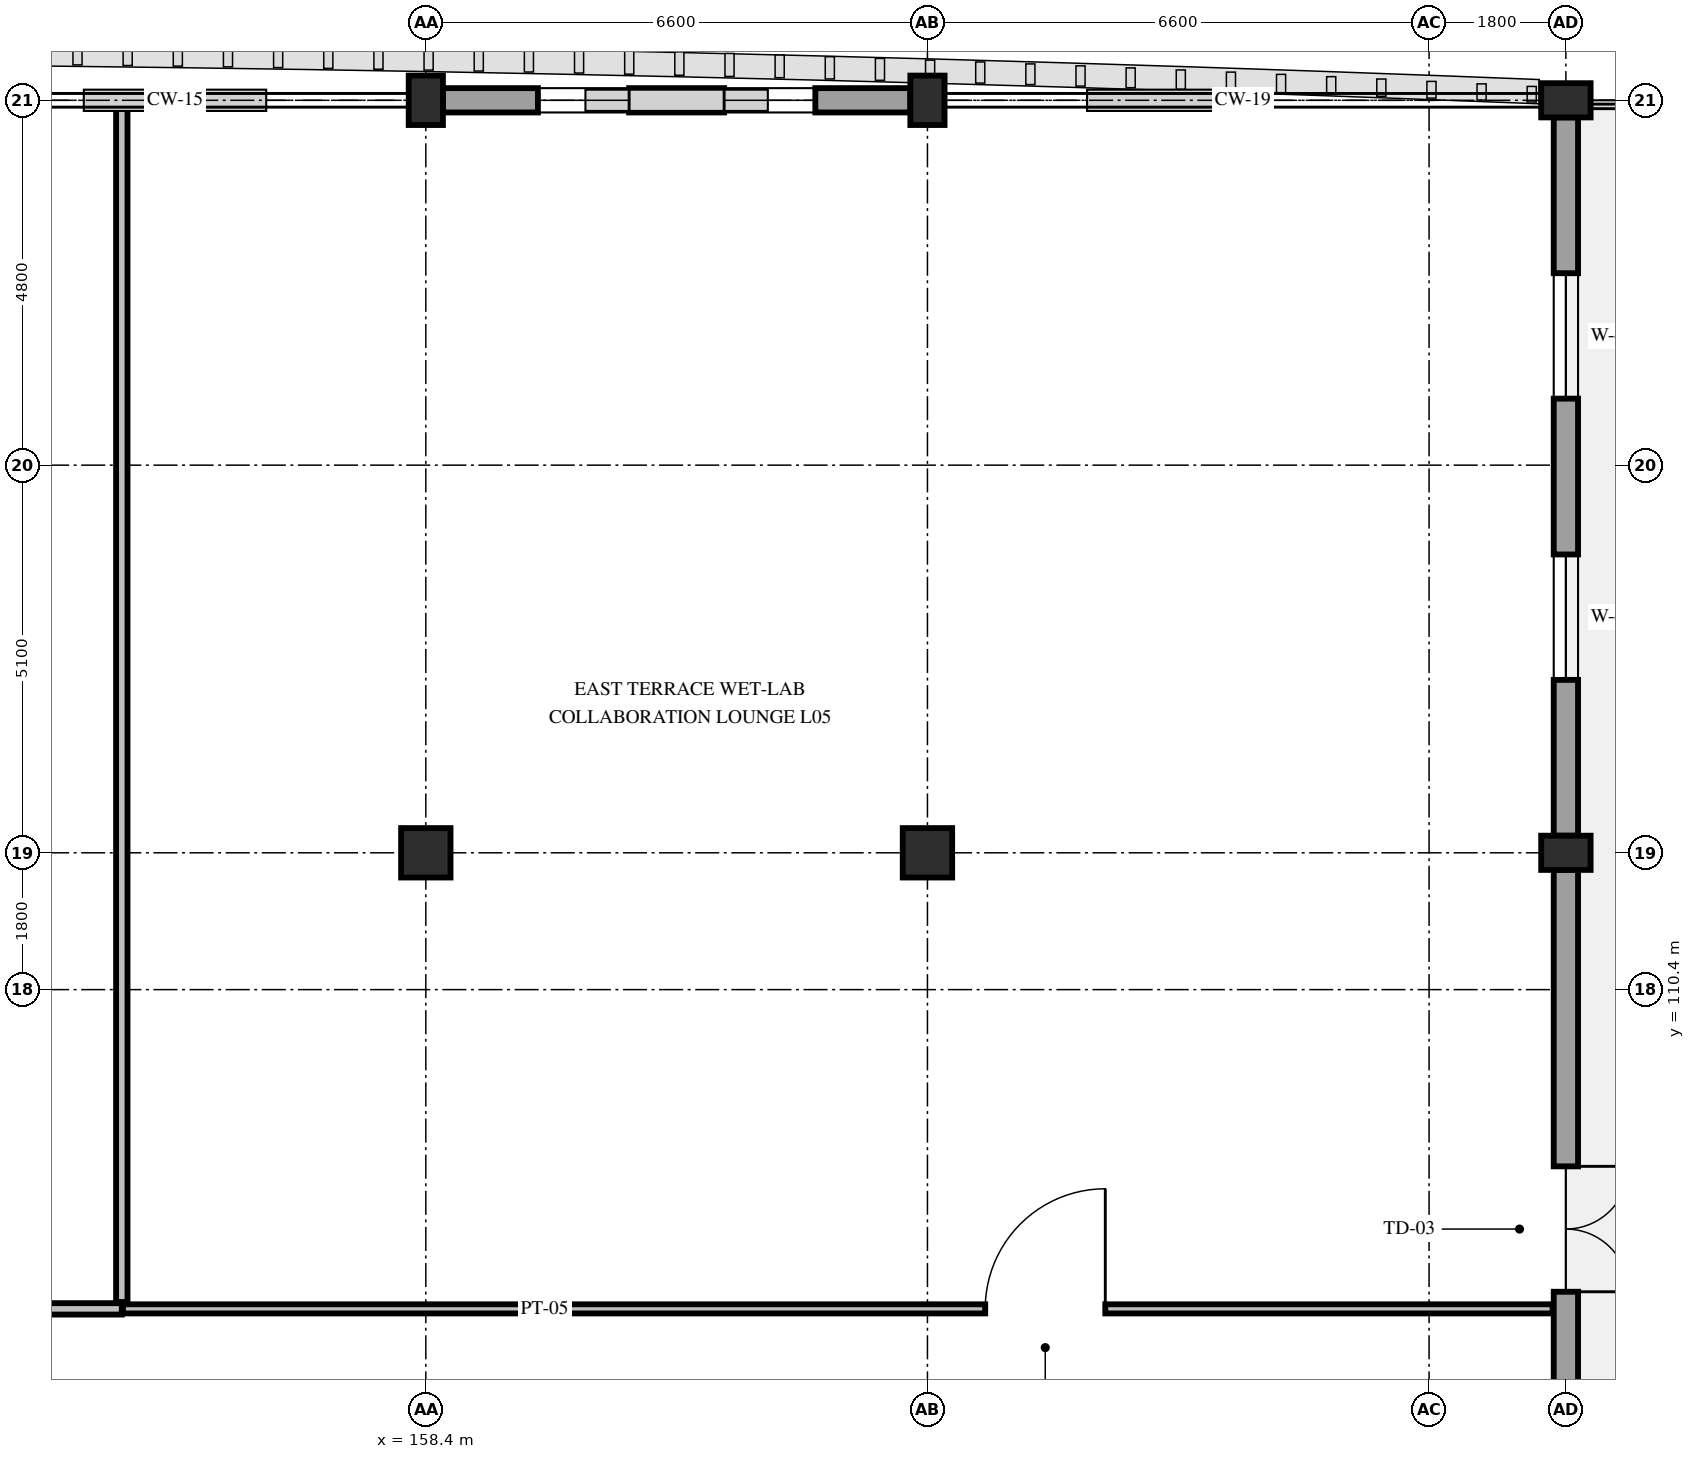
"""IFC4 building model, lengths in metres.
Left out: names, types, materials, properties, quantities, classifications, styles, units other than length and angle.
Written with IfcOpenShell. Run it as: python <this file> out.ifc"""

import sys

from ifc_helpers import new_model, si_unit, direction, frame, frame_2d, origin, origin_2d, place, context, subcontext, project, spatial, rectangle, extrude, element, fill, save


model = new_model("IFC4")
c1 = context("Model", 3, precision=1e-05, world=origin(), true_north=direction((0.0, 1.0)))
c2 = subcontext(c1, "Body", "Model", "MODEL_VIEW")
j1 = project(units=[si_unit("LENGTHUNIT", "METRE"), si_unit("PLANEANGLEUNIT", "RADIAN")], contexts=[c1])
p1 = place(None, origin())
s1 = spatial("IfcSite", under=j1, at=p1, CompositionType="ELEMENT")
p2 = place(p1, origin())
s2 = spatial("IfcBuilding", under=s1, at=p2, CompositionType="ELEMENT")
p3 = place(p2, frame((0.0, 0.0, 24.6)))
s3 = spatial("IfcBuildingStorey", under=s2, at=p3, CompositionType="ELEMENT", Elevation=24.6)
p4 = place(p3, frame((158.4, 112.2, 0.0), z_axis=(0.0, 0.0, 1.0), x_axis=(1.0, 0.0, 0.0)))
e1 = element("IfcColumn", 1, at=p4, inside=s3, PredefinedType="COLUMN", context=c2, shape_type="SweptSolid", body=[
    extrude(rectangle(XDim=0.65, YDim=0.65, at=origin_2d()), origin(), (0.0, 0.0, 1.0), 4.8),
])
p5 = place(p3, frame((158.4, 122.1, 0.0), z_axis=(0.0, 0.0, 1.0), x_axis=(1.0, 0.0, 0.0)))
e2 = element("IfcColumn", 2, at=p5, inside=s3, PredefinedType="PILASTER", context=c2, shape_type="SweptSolid", body=[
    extrude(rectangle(XDim=0.45, YDim=0.65, at=origin_2d()), origin(), (0.0, 0.0, 1.0), 4.8),
])
p6 = place(p3, frame((165.0, 112.2, 0.0), z_axis=(0.0, 0.0, 1.0), x_axis=(1.0, 0.0, 0.0)))
e3 = element("IfcColumn", 3, at=p6, inside=s3, PredefinedType="COLUMN", context=c2, shape_type="SweptSolid", body=[
    extrude(rectangle(XDim=0.65, YDim=0.65, at=origin_2d()), origin(), (0.0, 0.0, 1.0), 4.8),
])
for number, where, z_axis, x_axis in (
    (4, (165.0, 122.1, 0.0), (0.0, 0.0, 1.0), (1.0, 0.0, 0.0)),
    (5, (173.4, 112.2, 0.0), (0.0, 0.0, 1.0), (0.0, 1.0, 0.0)),
    (6, (173.4, 122.1, 0.0), (0.0, 0.0, 1.0), (0.0, 1.0, 0.0)),
):
    element("IfcColumn", number, at=place(p3, frame(where, z_axis=z_axis, x_axis=x_axis)), inside=s3, PredefinedType="PILASTER", context=c2, shape_type="SweptSolid", body=[
        extrude(rectangle(XDim=0.45, YDim=0.65, at=origin_2d()), origin(), (0.0, 0.0, 1.0), 4.8),
    ])
p7 = place(p3, frame((158.625, 122.1, 0.0), z_axis=(0.0, 0.0, 1.0), x_axis=(1.0, 0.0, 0.0)))
e7 = element("IfcWall", 7, at=p7, inside=s3, PredefinedType="STANDARD", context=c2, shape_type="SweptSolid", body=[
    extrude(rectangle(XDim=6.15, YDim=0.32, at=frame_2d((3.075, 0.0))), origin(), (0.0, 0.0, 1.0), 3.78),
])
p8 = place(p7, frame((1.25, 0.0, 0.85)))
e8 = element("IfcOpeningElement", 8, at=p8, cuts=e7, PredefinedType="OPENING", context=c2, shape_type="SweptSolid", body=[
    extrude(rectangle(XDim=1.2, YDim=2.08, at=frame_2d((0.6, 1.04))), frame((0.0, 0.175, 0.0), z_axis=(0.0, -1.0, 0.0), x_axis=(1.0, 0.0, 0.0)), (0.0, 0.0, 1.0), 0.35),
])
p9 = place(p7, frame((3.7, 0.0, 0.85)))
e9 = element("IfcOpeningElement", 9, at=p9, cuts=e7, PredefinedType="OPENING", context=c2, shape_type="SweptSolid", body=[
    extrude(rectangle(XDim=1.2, YDim=2.08, at=frame_2d((0.6, 1.04))), frame((0.0, 0.175, 0.0), z_axis=(0.0, -1.0, 0.0), x_axis=(1.0, 0.0, 0.0)), (0.0, 0.0, 1.0), 0.35),
])
p10 = place(p3, frame((173.4, 121.875, 0.0), z_axis=(0.0, 0.0, 1.0), x_axis=(0.0, -1.0, 0.0)))
e10 = element("IfcWall", 10, at=p10, inside=s3, PredefinedType="STANDARD", context=c2, shape_type="SweptSolid", body=[
    extrude(rectangle(XDim=9.45, YDim=0.32, at=frame_2d((4.725, 0.0))), origin(), (0.0, 0.0, 1.0), 3.83),
])
p11 = place(p10, frame((2.05, 0.0, 0.85)))
e11 = element("IfcOpeningElement", 11, at=p11, cuts=e10, PredefinedType="OPENING", context=c2, shape_type="SweptSolid", body=[
    extrude(rectangle(XDim=1.65, YDim=2.08, at=frame_2d((0.825, 1.04))), frame((0.0, 0.175, 0.0), z_axis=(0.0, -1.0, 0.0), x_axis=(1.0, 0.0, 0.0)), (0.0, 0.0, 1.0), 0.35),
])
p12 = place(p10, frame((5.75, 0.0, 0.85)))
e12 = element("IfcOpeningElement", 12, at=p12, cuts=e10, PredefinedType="OPENING", context=c2, shape_type="SweptSolid", body=[
    extrude(rectangle(XDim=1.65, YDim=2.08, at=frame_2d((0.825, 1.04))), frame((0.0, 0.175, 0.0), z_axis=(0.0, -1.0, 0.0), x_axis=(1.0, 0.0, 0.0)), (0.0, 0.0, 1.0), 0.35),
])
p13 = place(p3, frame((173.4, 111.975, 0.0), z_axis=(0.0, 0.0, 1.0), x_axis=(0.0, -1.0, 0.0)))
e13 = element("IfcWall", 13, at=p13, inside=s3, PredefinedType="STANDARD", context=c2, shape_type="SweptSolid", body=[
    extrude(rectangle(XDim=9.45, YDim=0.32, at=frame_2d((4.725, 0.0))), origin(), (0.0, 0.0, 1.0), 3.83),
])
p14 = place(p13, frame((3.9, 0.0, 0.0)))
e14 = element("IfcOpeningElement", 14, at=p14, cuts=e13, PredefinedType="OPENING", context=c2, shape_type="SweptSolid", body=[
    extrude(rectangle(XDim=1.65, YDim=2.25, at=frame_2d((0.825, 1.125))), frame((0.0, 0.175, 0.0), z_axis=(0.0, -1.0, 0.0), x_axis=(1.0, 0.0, 0.0)), (0.0, 0.0, 1.0), 0.35),
])
p15 = place(p3, frame((138.69, 106.2, 0.0), z_axis=(0.0, 0.0, 1.0), x_axis=(1.0, 0.0, 0.0)))
e15 = element("IfcWall", 15, at=p15, inside=s3, PredefinedType="PARTITIONING", context=c2, shape_type="SweptSolid", body=[
    extrude(rectangle(XDim=15.71, YDim=0.15, at=frame_2d((7.855, 0.0))), origin(), (0.0, 0.0, 1.0), 3.78),
])
p16 = place(p15, frame((7.31, 0.0, 0.0)))
e16 = element("IfcOpeningElement", 16, at=p16, cuts=e15, PredefinedType="OPENING", context=c2, shape_type="SweptSolid", body=[
    extrude(rectangle(XDim=1.5, YDim=2.25, at=frame_2d((0.75, 1.125))), frame((0.0, 0.09, 0.0), z_axis=(0.0, -1.0, 0.0), x_axis=(1.0, 0.0, 0.0)), (0.0, 0.0, 1.0), 0.18),
])
p17 = place(p3, frame((154.4, 106.29, 0.0), z_axis=(0.0, 0.0, 1.0), x_axis=(0.0, 1.0, 0.0)))
e17 = element("IfcWall", 17, at=p17, inside=s3, PredefinedType="PARTITIONING", context=c2, shape_type="SweptSolid", body=[
    extrude(rectangle(XDim=15.77, YDim=0.15, at=frame_2d((7.885, 0.0))), origin(), (0.0, 0.0, 1.0), 3.93),
])
p18 = place(p3, frame((154.415, 106.2, 0.0), z_axis=(0.0, 0.0, 1.0), x_axis=(1.0, 0.0, 0.0)))
e18 = element("IfcWall", 18, at=p18, inside=s3, PredefinedType="PARTITIONING", context=c2, shape_type="SweptSolid", body=[
    extrude(rectangle(XDim=18.81, YDim=0.12, at=frame_2d((9.405, 0.0))), origin(), (0.0, 0.0, 1.0), 3.78),
])
p19 = place(p18, frame((11.345, 0.0, 0.0)))
e19 = element("IfcOpeningElement", 19, at=p19, cuts=e18, PredefinedType="OPENING", context=c2, shape_type="SweptSolid", body=[
    extrude(rectangle(XDim=1.58, YDim=2.3, at=frame_2d((0.79, 1.15))), frame((0.0, 0.075, 0.0), z_axis=(0.0, -1.0, 0.0), x_axis=(1.0, 0.0, 0.0)), (0.0, 0.0, 1.0), 0.15),
])
p20 = place(p8, origin())
e20 = element("IfcWindow", 20, at=p20, inside=s3, PartitioningType="SINGLE_PANEL", PredefinedType="WINDOW", context=c2, shape_type="SweptSolid", body=[
    extrude(rectangle(XDim=1.2, YDim=2.08, at=frame_2d((0.6, 1.04))), frame((0.0, 0.03, 0.0), z_axis=(0.0, -1.0, 0.0), x_axis=(1.0, 0.0, 0.0)), (0.0, 0.0, 1.0), 0.06),
])
fill(e8, e20)
p21 = place(p9, origin())
e21 = element("IfcWindow", 21, at=p21, inside=s3, PartitioningType="SINGLE_PANEL", PredefinedType="WINDOW", context=c2, shape_type="SweptSolid", body=[
    extrude(rectangle(XDim=1.2, YDim=2.08, at=frame_2d((0.6, 1.04))), frame((0.0, 0.03, 0.0), z_axis=(0.0, -1.0, 0.0), x_axis=(1.0, 0.0, 0.0)), (0.0, 0.0, 1.0), 0.06),
])
fill(e9, e21)
p22 = place(p11, origin())
e22 = element("IfcWindow", 22, at=p22, inside=s3, PartitioningType="SINGLE_PANEL", PredefinedType="WINDOW", context=c2, shape_type="SweptSolid", body=[
    extrude(rectangle(XDim=1.65, YDim=2.08, at=frame_2d((0.825, 1.04))), frame((0.0, 0.03, 0.0), z_axis=(0.0, -1.0, 0.0), x_axis=(1.0, 0.0, 0.0)), (0.0, 0.0, 1.0), 0.06),
])
fill(e11, e22)
p23 = place(p12, origin())
e23 = element("IfcWindow", 23, at=p23, inside=s3, PartitioningType="SINGLE_PANEL", PredefinedType="WINDOW", context=c2, shape_type="SweptSolid", body=[
    extrude(rectangle(XDim=1.65, YDim=2.08, at=frame_2d((0.825, 1.04))), frame((0.0, 0.03, 0.0), z_axis=(0.0, -1.0, 0.0), x_axis=(1.0, 0.0, 0.0)), (0.0, 0.0, 1.0), 0.06),
])
fill(e12, e23)
p24 = place(p14, origin())
e24 = element("IfcDoor", 24, at=p24, inside=s3, OperationType="DOUBLE_DOOR_SINGLE_SWING", PredefinedType="DOOR", context=c2, shape_type="SweptSolid", body=[
    extrude(rectangle(XDim=1.65, YDim=2.25, at=frame_2d((0.825, 1.125))), frame((0.0, 0.025, 0.0), z_axis=(0.0, -1.0, 0.0), x_axis=(1.0, 0.0, 0.0)), (0.0, 0.0, 1.0), 0.05),
])
fill(e14, e24)
p25 = place(p19, origin())
e25 = element("IfcDoor", 25, at=p25, inside=s3, OperationType="SINGLE_SWING_RIGHT", PredefinedType="DOOR", context=c2, shape_type="SweptSolid", body=[
    extrude(rectangle(XDim=1.58, YDim=2.3, at=frame_2d((0.79, 1.15))), frame((0.0, 0.025, 0.0), z_axis=(0.0, -1.0, 0.0), x_axis=(1.0, 0.0, 0.0)), (0.0, 0.0, 1.0), 0.05),
])
fill(e19, e25)
save(model, sys.argv[1])
